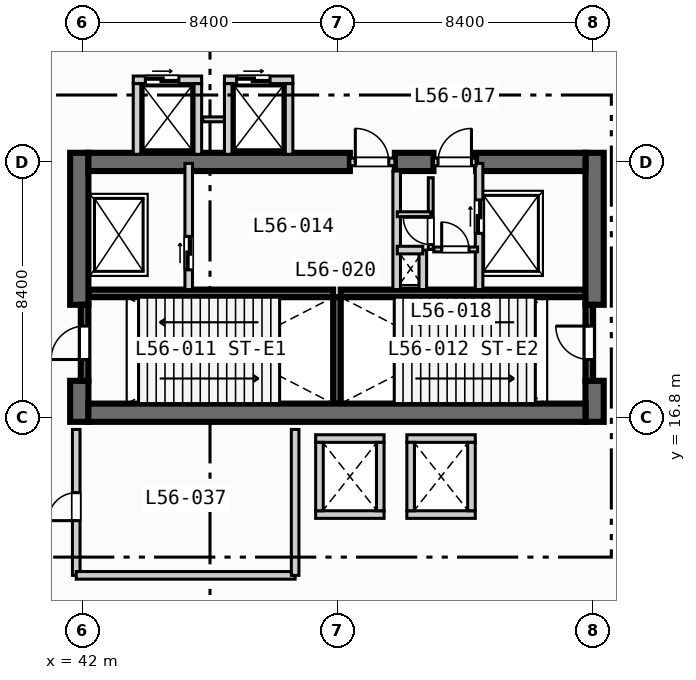
"""IFC4 building model, lengths in metres.
Left out: names, types, materials, properties, quantities, classifications, styles, units other than length and angle.
Written with IfcOpenShell. Run it as: python <this file> out.ifc"""

import sys

from ifc_helpers import new_model, si_unit, direction, frame, frame_2d, origin, place, context, subcontext, project, spatial, rectangle, extrude, element, fill, save


model = new_model("IFC4")
c1 = context("Model", 3, precision=1e-05, world=origin(), true_north=direction((0.0, 1.0)))
c2 = subcontext(c1, "Body", "Model", "MODEL_VIEW")
j1 = project(units=[si_unit("LENGTHUNIT", "METRE"), si_unit("PLANEANGLEUNIT", "RADIAN")], contexts=[c1])
p1 = place(None, origin())
s1 = spatial("IfcSite", under=j1, at=p1, CompositionType="ELEMENT")
p2 = place(p1, origin())
s2 = spatial("IfcBuilding", under=s1, at=p2, CompositionType="ELEMENT")
p3 = place(p2, frame((0.0, 0.0, 228.2)))
s3 = spatial("IfcBuildingStorey", under=s2, at=p3, CompositionType="ELEMENT", Elevation=228.2)
for number, where, z_axis, x_axis in (
    (1, (42.2, 20.875, 0.0), (0.0, 0.0, 1.0), (1.0, 0.0, 0.0)),
    (2, (50.5, 20.875, 0.0), (0.0, 0.0, 1.0), (1.0, 0.0, 0.0)),
):
    element("IfcWall", number, at=place(p3, frame(where, z_axis=z_axis, x_axis=x_axis)), inside=s3, PredefinedType="SOLIDWALL", context=c2, shape_type="SweptSolid", body=[
        extrude(rectangle(XDim=8.05, YDim=0.25, at=frame_2d((4.025, 0.0))), origin(), (0.0, 0.0, 1.0), 5.77),
    ])
p4 = place(p3, frame((50.375, 17.25, 0.0), z_axis=(0.0, 0.0, 1.0), x_axis=(0.0, 1.0, 0.0)))
e3 = element("IfcWall", 3, at=p4, inside=s3, PredefinedType="SOLIDWALL", context=c2, shape_type="SweptSolid", body=[
    extrude(rectangle(XDim=3.5, YDim=0.25, at=frame_2d((1.75, 0.0))), origin(), (0.0, 0.0, 1.0), 5.77),
])
p5 = place(p3, frame((41.9, 16.65, 0.0), z_axis=(0.0, 0.0, 1.0), x_axis=(0.0, 1.0, 0.0)))
e4 = element("IfcWall", 4, at=p5, inside=s3, PredefinedType="SHEAR", context=c2, shape_type="SweptSolid", body=[
    extrude(rectangle(XDim=1.35, YDim=0.6, at=frame_2d((0.675, 0.0))), origin(), (0.0, 0.0, 1.0), 5.77),
])
p6 = place(p3, frame((41.9, 20.5, 0.0), z_axis=(0.0, 0.0, 1.0), x_axis=(0.0, 1.0, 0.0)))
e5 = element("IfcWall", 5, at=p6, inside=s3, PredefinedType="SHEAR", context=c2, shape_type="SweptSolid", body=[
    extrude(rectangle(XDim=5.0, YDim=0.6, at=frame_2d((2.5, 0.0))), origin(), (0.0, 0.0, 1.0), 5.77),
])
p7 = place(p3, frame((58.85, 16.65, 0.0), z_axis=(0.0, 0.0, 1.0), x_axis=(0.0, 1.0, 0.0)))
e6 = element("IfcWall", 6, at=p7, inside=s3, PredefinedType="SHEAR", context=c2, shape_type="SweptSolid", body=[
    extrude(rectangle(XDim=1.35, YDim=0.6, at=frame_2d((0.675, 0.0))), origin(), (0.0, 0.0, 1.0), 5.77),
])
p8 = place(p3, frame((58.85, 20.5, 0.0), z_axis=(0.0, 0.0, 1.0), x_axis=(0.0, 1.0, 0.0)))
e7 = element("IfcWall", 7, at=p8, inside=s3, PredefinedType="SHEAR", context=c2, shape_type="SweptSolid", body=[
    extrude(rectangle(XDim=5.0, YDim=0.6, at=frame_2d((2.5, 0.0))), origin(), (0.0, 0.0, 1.0), 5.77),
])
p9 = place(p3, frame((42.2, 16.95, 0.0), z_axis=(0.0, 0.0, 1.0), x_axis=(1.0, 0.0, 0.0)))
e8 = element("IfcWall", 8, at=p9, inside=s3, PredefinedType="SHEAR", context=c2, shape_type="SweptSolid", body=[
    extrude(rectangle(XDim=16.35, YDim=0.6, at=frame_2d((8.175, 0.0))), origin(), (0.0, 0.0, 1.0), 5.77),
])
p10 = place(p3, frame((42.2, 25.2, 0.0), z_axis=(0.0, 0.0, 1.0), x_axis=(1.0, 0.0, 0.0)))
e9 = element("IfcWall", 9, at=p10, inside=s3, PredefinedType="SHEAR", context=c2, shape_type="SweptSolid", body=[
    extrude(rectangle(XDim=8.6, YDim=0.6, at=frame_2d((4.3, 0.0))), origin(), (0.0, 0.0, 1.0), 5.77),
])
p11 = place(p3, frame((52.28, 25.2, 0.0), z_axis=(0.0, 0.0, 1.0), x_axis=(1.0, 0.0, 0.0)))
e10 = element("IfcWall", 10, at=p11, inside=s3, PredefinedType="SHEAR", context=c2, shape_type="SweptSolid", body=[
    extrude(rectangle(XDim=1.27, YDim=0.6, at=frame_2d((0.635, 0.0))), origin(), (0.0, 0.0, 1.0), 5.77),
])
p12 = place(p3, frame((54.95, 25.2, 0.0), z_axis=(0.0, 0.0, 1.0), x_axis=(1.0, 0.0, 0.0)))
e11 = element("IfcWall", 11, at=p12, inside=s3, PredefinedType="SHEAR", context=c2, shape_type="SweptSolid", body=[
    extrude(rectangle(XDim=3.6, YDim=0.6, at=frame_2d((1.8, 0.0))), origin(), (0.0, 0.0, 1.0), 5.77),
])
p13 = place(p3, frame((42.075, 18.0, 0.0), z_axis=(0.0, 0.0, 1.0), x_axis=(0.0, 1.0, 0.0)))
e12 = element("IfcWall", 12, at=p13, inside=s3, PredefinedType="SOLIDWALL", context=c2, shape_type="SweptSolid", body=[
    extrude(rectangle(XDim=2.5, YDim=0.25, at=frame_2d((1.25, 0.0))), origin(), (0.0, 0.0, 1.0), 5.77),
])
p14 = place(p13, frame((0.7, 0.0, 0.0)))
e13 = element("IfcOpeningElement", 13, at=p14, cuts=e12, PredefinedType="OPENING", context=c2, shape_type="SweptSolid", body=[
    extrude(rectangle(XDim=1.1, YDim=2.15, at=frame_2d((0.55, 1.075))), frame((0.0, 0.135, 0.0), z_axis=(0.0, -1.0, 0.0), x_axis=(1.0, 0.0, 0.0)), (0.0, 0.0, 1.0), 0.27),
])
p15 = place(p3, frame((58.675, 18.0, 0.0), z_axis=(0.0, 0.0, 1.0), x_axis=(0.0, 1.0, 0.0)))
e14 = element("IfcWall", 14, at=p15, inside=s3, PredefinedType="SOLIDWALL", context=c2, shape_type="SweptSolid", body=[
    extrude(rectangle(XDim=2.5, YDim=0.25, at=frame_2d((1.25, 0.0))), origin(), (0.0, 0.0, 1.0), 5.77),
])
p16 = place(p15, frame((0.7, 0.0, 0.0)))
e15 = element("IfcOpeningElement", 15, at=p16, cuts=e14, PredefinedType="OPENING", context=c2, shape_type="SweptSolid", body=[
    extrude(rectangle(XDim=1.1, YDim=2.15, at=frame_2d((0.55, 1.075))), frame((0.0, 0.135, 0.0), z_axis=(0.0, -1.0, 0.0), x_axis=(1.0, 0.0, 0.0)), (0.0, 0.0, 1.0), 0.27),
])
p17 = place(p3, frame((45.5, 21.0, 0.0), z_axis=(0.0, 0.0, 1.0), x_axis=(0.0, 1.0, 0.0)))
e16 = element("IfcWall", 16, at=p17, inside=s3, PredefinedType="SOLIDWALL", context=c2, shape_type="SweptSolid", body=[
    extrude(rectangle(XDim=4.15, YDim=0.25, at=frame_2d((2.075, 0.0))), origin(), (0.0, 0.0, 1.0), 5.77),
])
p18 = place(p17, frame((0.65, 0.0, 0.0)))
e17 = element("IfcOpeningElement", 17, at=p18, cuts=e16, PredefinedType="OPENING", context=c2, shape_type="SweptSolid", body=[
    extrude(rectangle(XDim=1.1, YDim=2.15, at=frame_2d((0.55, 1.075))), frame((0.0, 0.135, 0.0), z_axis=(0.0, -1.0, 0.0), x_axis=(1.0, 0.0, 0.0)), (0.0, 0.0, 1.0), 0.27),
])
p19 = place(p3, frame((50.8, 25.2, 0.0), z_axis=(0.0, 0.0, 1.0), x_axis=(1.0, 0.0, 0.0)))
e18 = element("IfcWall", 18, at=p19, inside=s3, PredefinedType="SOLIDWALL", context=c2, shape_type="SweptSolid", body=[
    extrude(rectangle(XDim=1.48, YDim=0.25, at=frame_2d((0.74, 0.0))), origin(), (0.0, 0.0, 1.0), 5.77),
])
p20 = place(p19, frame((0.18, 0.0, 0.0)))
e19 = element("IfcOpeningElement", 19, at=p20, cuts=e18, PredefinedType="OPENING", context=c2, shape_type="SweptSolid", body=[
    extrude(rectangle(XDim=1.1, YDim=2.15, at=frame_2d((0.55, 1.075))), frame((0.0, 0.135, 0.0), z_axis=(0.0, -1.0, 0.0), x_axis=(1.0, 0.0, 0.0)), (0.0, 0.0, 1.0), 0.27),
])
p21 = place(p3, frame((52.34, 21.0, 0.0), z_axis=(0.0, 0.0, 1.0), x_axis=(0.0, 1.0, 0.0)))
e20 = element("IfcWall", 20, at=p21, inside=s3, PredefinedType="SOLIDWALL", context=c2, shape_type="SweptSolid", body=[
    extrude(rectangle(XDim=3.9, YDim=0.25, at=frame_2d((1.95, 0.0))), origin(), (0.0, 0.0, 1.0), 5.77),
])
p22 = place(p3, frame((55.05, 21.0, 0.0), z_axis=(0.0, 0.0, 1.0), x_axis=(0.0, 1.0, 0.0)))
e21 = element("IfcWall", 21, at=p22, inside=s3, PredefinedType="SOLIDWALL", context=c2, shape_type="SweptSolid", body=[
    extrude(rectangle(XDim=4.15, YDim=0.25, at=frame_2d((2.075, 0.0))), origin(), (0.0, 0.0, 1.0), 5.77),
])
p23 = place(p22, frame((1.85, 0.0, 0.0)))
e22 = element("IfcOpeningElement", 22, at=p23, cuts=e21, PredefinedType="OPENING", context=c2, shape_type="SweptSolid", body=[
    extrude(rectangle(XDim=1.1, YDim=2.15, at=frame_2d((0.55, 1.075))), frame((0.0, 0.135, 0.0), z_axis=(0.0, -1.0, 0.0), x_axis=(1.0, 0.0, 0.0)), (0.0, 0.0, 1.0), 0.27),
])
p24 = place(p3, frame((53.55, 25.2, 0.0), z_axis=(0.0, 0.0, 1.0), x_axis=(1.0, 0.0, 0.0)))
e23 = element("IfcWall", 23, at=p24, inside=s3, PredefinedType="SOLIDWALL", context=c2, shape_type="SweptSolid", body=[
    extrude(rectangle(XDim=1.4, YDim=0.25, at=frame_2d((0.7, 0.0))), origin(), (0.0, 0.0, 1.0), 5.77),
])
p25 = place(p24, frame((0.15, 0.0, 0.0)))
e24 = element("IfcOpeningElement", 24, at=p25, cuts=e23, PredefinedType="OPENING", context=c2, shape_type="SweptSolid", body=[
    extrude(rectangle(XDim=1.1, YDim=2.15, at=frame_2d((0.55, 1.075))), frame((0.0, 0.135, 0.0), z_axis=(0.0, -1.0, 0.0), x_axis=(1.0, 0.0, 0.0)), (0.0, 0.0, 1.0), 0.27),
])
p26 = place(p3, frame((53.2, 21.0, 0.0), z_axis=(0.0, 0.0, 1.0), x_axis=(0.0, 1.0, 0.0)))
e25 = element("IfcWall", 25, at=p26, inside=s3, PredefinedType="SOLIDWALL", context=c2, shape_type="SweptSolid", body=[
    extrude(rectangle(XDim=1.3, YDim=0.25, at=frame_2d((0.65, 0.0))), origin(), (0.0, 0.0, 1.0), 5.77),
])
p27 = place(p3, frame((52.36, 22.3, 0.0), z_axis=(0.0, 0.0, 1.0), x_axis=(1.0, 0.0, 0.0)))
e26 = element("IfcWall", 26, at=p27, inside=s3, PredefinedType="SOLIDWALL", context=c2, shape_type="SweptSolid", body=[
    extrude(rectangle(XDim=0.84, YDim=0.25, at=frame_2d((0.42, 0.0))), origin(), (0.0, 0.0, 1.0), 5.77),
])
p28 = place(p3, frame((53.56, 22.32, 0.0), z_axis=(0.0, 0.0, 1.0), x_axis=(1.0, 0.0, 0.0)))
e27 = element("IfcWall", 27, at=p28, inside=s3, PredefinedType="PARTITIONING", context=c2, shape_type="SweptSolid", body=[
    extrude(rectangle(XDim=1.44, YDim=0.16, at=frame_2d((0.72, 0.0))), origin(), (0.0, 0.0, 1.0), 5.77),
])
p29 = place(p28, frame((0.26, 0.0, 0.0)))
e28 = element("IfcOpeningElement", 28, at=p29, cuts=e27, PredefinedType="OPENING", context=c2, shape_type="SweptSolid", body=[
    extrude(rectangle(XDim=0.9, YDim=2.1, at=frame_2d((0.45, 1.05))), frame((0.0, 0.09, 0.0), z_axis=(0.0, -1.0, 0.0), x_axis=(1.0, 0.0, 0.0)), (0.0, 0.0, 1.0), 0.18),
])
p30 = place(p3, frame((53.46, 22.32, 0.0), z_axis=(0.0, 0.0, 1.0), x_axis=(0.0, 1.0, 0.0)))
e29 = element("IfcWall", 29, at=p30, inside=s3, PredefinedType="PARTITIONING", context=c2, shape_type="SweptSolid", body=[
    extrude(rectangle(XDim=2.36, YDim=0.16, at=frame_2d((1.18, 0.0))), origin(), (0.0, 0.0, 1.0), 5.77),
])
p31 = place(p30, frame((0.16, 0.0, 0.0)))
e30 = element("IfcOpeningElement", 30, at=p31, cuts=e29, PredefinedType="OPENING", context=c2, shape_type="SweptSolid", body=[
    extrude(rectangle(XDim=0.9, YDim=2.1, at=frame_2d((0.45, 1.05))), frame((0.0, 0.09, 0.0), z_axis=(0.0, -1.0, 0.0), x_axis=(1.0, 0.0, 0.0)), (0.0, 0.0, 1.0), 0.18),
])
p32 = place(p3, frame((52.36, 23.48, 0.0), z_axis=(0.0, 0.0, 1.0), x_axis=(1.0, 0.0, 0.0)))
e31 = element("IfcWall", 31, at=p32, inside=s3, PredefinedType="PARTITIONING", context=c2, shape_type="SweptSolid", body=[
    extrude(rectangle(XDim=1.1, YDim=0.16, at=frame_2d((0.55, 0.0))), origin(), (0.0, 0.0, 1.0), 5.77),
])
for number, where, z_axis, x_axis in (
    (32, (49.675, 13.6, 0.0), (0.0, 0.0, 1.0), (1.0, 0.0, 0.0)),
    (33, (49.675, 16.1, 0.0), (0.0, 0.0, 1.0), (1.0, 0.0, 0.0)),
    (34, (49.8, 13.725, 0.0), (0.0, 0.0, 1.0), (0.0, 1.0, 0.0)),
    (35, (51.8, 13.725, 0.0), (0.0, 0.0, 1.0), (0.0, 1.0, 0.0)),
    (36, (52.675, 13.6, 0.0), (0.0, 0.0, 1.0), (1.0, 0.0, 0.0)),
    (37, (52.675, 16.1, 0.0), (0.0, 0.0, 1.0), (1.0, 0.0, 0.0)),
    (38, (52.8, 13.725, 0.0), (0.0, 0.0, 1.0), (0.0, 1.0, 0.0)),
    (39, (54.8, 13.725, 0.0), (0.0, 0.0, 1.0), (0.0, 1.0, 0.0)),
):
    element("IfcWall", number, at=place(p3, frame(where, z_axis=z_axis, x_axis=x_axis)), inside=s3, PredefinedType="SOLIDWALL", context=c2, shape_type="SweptSolid", body=[
        extrude(rectangle(XDim=2.25, YDim=0.25, at=frame_2d((1.125, 0.0))), origin(), (0.0, 0.0, 1.0), 5.77),
    ])
p33 = place(p3, frame((43.675, 27.9, 0.0), z_axis=(0.0, 0.0, 1.0), x_axis=(1.0, 0.0, 0.0)))
e40 = element("IfcWall", 40, at=p33, inside=s3, PredefinedType="SOLIDWALL", context=c2, shape_type="SweptSolid", body=[
    extrude(rectangle(XDim=2.25, YDim=0.25, at=frame_2d((1.125, 0.0))), origin(), (0.0, 0.0, 1.0), 5.77),
])
p34 = place(p33, frame((0.4, 0.0, 0.0)))
e41 = element("IfcOpeningElement", 41, at=p34, cuts=e40, PredefinedType="OPENING", context=c2, shape_type="SweptSolid", body=[
    extrude(rectangle(XDim=1.1, YDim=2.15, at=frame_2d((0.55, 1.075))), frame((0.0, 0.135, 0.0), z_axis=(0.0, -1.0, 0.0), x_axis=(1.0, 0.0, 0.0)), (0.0, 0.0, 1.0), 0.27),
])
for number, where, z_axis, x_axis in (
    (42, (43.8, 25.45, 0.0), (0.0, 0.0, 1.0), (0.0, 1.0, 0.0)),
    (43, (45.8, 25.45, 0.0), (0.0, 0.0, 1.0), (0.0, 1.0, 0.0)),
):
    element("IfcWall", number, at=place(p3, frame(where, z_axis=z_axis, x_axis=x_axis)), inside=s3, PredefinedType="SOLIDWALL", context=c2, shape_type="SweptSolid", body=[
        extrude(rectangle(XDim=2.325, YDim=0.25, at=frame_2d((1.163, 0.0))), origin(), (0.0, 0.0, 1.0), 5.77),
    ])
p35 = place(p3, frame((45.96, 26.6, 0.0), z_axis=(0.0, 0.0, 1.0), x_axis=(1.0, 0.0, 0.0)))
e44 = element("IfcWall", 44, at=p35, inside=s3, PredefinedType="PARTITIONING", context=c2, shape_type="SweptSolid", body=[
    extrude(rectangle(XDim=0.88, YDim=0.16, at=frame_2d((0.44, 0.0))), origin(), (0.0, 0.0, 1.0), 5.77),
])
p36 = place(p3, frame((46.675, 27.9, 0.0), z_axis=(0.0, 0.0, 1.0), x_axis=(1.0, 0.0, 0.0)))
e45 = element("IfcWall", 45, at=p36, inside=s3, PredefinedType="SOLIDWALL", context=c2, shape_type="SweptSolid", body=[
    extrude(rectangle(XDim=2.25, YDim=0.25, at=frame_2d((1.125, 0.0))), origin(), (0.0, 0.0, 1.0), 5.77),
])
p37 = place(p36, frame((0.4, 0.0, 0.0)))
e46 = element("IfcOpeningElement", 46, at=p37, cuts=e45, PredefinedType="OPENING", context=c2, shape_type="SweptSolid", body=[
    extrude(rectangle(XDim=1.1, YDim=2.15, at=frame_2d((0.55, 1.075))), frame((0.0, 0.135, 0.0), z_axis=(0.0, -1.0, 0.0), x_axis=(1.0, 0.0, 0.0)), (0.0, 0.0, 1.0), 0.27),
])
for number, where, z_axis, x_axis in (
    (47, (46.8, 25.45, 0.0), (0.0, 0.0, 1.0), (0.0, 1.0, 0.0)),
    (48, (48.8, 25.45, 0.0), (0.0, 0.0, 1.0), (0.0, 1.0, 0.0)),
):
    element("IfcWall", number, at=place(p3, frame(where, z_axis=z_axis, x_axis=x_axis)), inside=s3, PredefinedType="SOLIDWALL", context=c2, shape_type="SweptSolid", body=[
        extrude(rectangle(XDim=2.325, YDim=0.25, at=frame_2d((1.163, 0.0))), origin(), (0.0, 0.0, 1.0), 5.77),
    ])
p38 = place(p3, frame((41.8, 11.6, 0.0), z_axis=(0.0, 0.0, 1.0), x_axis=(0.0, 1.0, 0.0)))
e49 = element("IfcWall", 49, at=p38, inside=s3, PredefinedType="SOLIDWALL", context=c2, shape_type="SweptSolid", body=[
    extrude(rectangle(XDim=4.8, YDim=0.25, at=frame_2d((2.4, 0.0))), origin(), (0.0, 0.0, 1.0), 5.407),
])
p39 = place(p38, frame((1.8, 0.0, 0.0)))
e50 = element("IfcOpeningElement", 50, at=p39, cuts=e49, PredefinedType="OPENING", context=c2, shape_type="SweptSolid", body=[
    extrude(rectangle(XDim=0.92, YDim=2.1, at=frame_2d((0.46, 1.05))), frame((0.0, 0.135, 0.0), z_axis=(0.0, -1.0, 0.0), x_axis=(1.0, 0.0, 0.0)), (0.0, 0.0, 1.0), 0.27),
])
p40 = place(p3, frame((41.8, 11.6, 0.0), z_axis=(0.0, 0.0, 1.0), x_axis=(1.0, 0.0, 0.0)))
e51 = element("IfcWall", 51, at=p40, inside=s3, PredefinedType="SOLIDWALL", context=c2, shape_type="SweptSolid", body=[
    extrude(rectangle(XDim=7.2, YDim=0.25, at=frame_2d((3.6, 0.0))), origin(), (0.0, 0.0, 1.0), 5.77),
])
p41 = place(p3, frame((49.0, 11.6, 0.0), z_axis=(0.0, 0.0, 1.0), x_axis=(0.0, 1.0, 0.0)))
e52 = element("IfcWall", 52, at=p41, inside=s3, PredefinedType="SOLIDWALL", context=c2, shape_type="SweptSolid", body=[
    extrude(rectangle(XDim=4.8, YDim=0.25, at=frame_2d((2.4, 0.0))), origin(), (0.0, 0.0, 1.0), 5.77),
])
p42 = place(p14, origin())
e53 = element("IfcDoor", 53, at=p42, inside=s3, OperationType="SINGLE_SWING_LEFT", PredefinedType="DOOR", context=c2, shape_type="SweptSolid", body=[
    extrude(rectangle(XDim=1.1, YDim=2.15, at=frame_2d((0.55, 1.075))), frame((0.0, 0.025, 0.0), z_axis=(0.0, -1.0, 0.0), x_axis=(1.0, 0.0, 0.0)), (0.0, 0.0, 1.0), 0.05),
])
fill(e13, e53)
p43 = place(p16, origin())
e54 = element("IfcDoor", 54, at=p43, inside=s3, OperationType="SINGLE_SWING_RIGHT", PredefinedType="DOOR", context=c2, shape_type="SweptSolid", body=[
    extrude(rectangle(XDim=1.1, YDim=2.15, at=frame_2d((0.55, 1.075))), frame((0.0, 0.025, 0.0), z_axis=(0.0, -1.0, 0.0), x_axis=(1.0, 0.0, 0.0)), (0.0, 0.0, 1.0), 0.05),
])
fill(e15, e54)
p44 = place(p18, origin())
e55 = element("IfcDoor", 55, at=p44, inside=s3, OperationType="SLIDING_TO_LEFT", PredefinedType="DOOR", context=c2, shape_type="SweptSolid", body=[
    extrude(rectangle(XDim=1.1, YDim=2.15, at=frame_2d((0.55, 1.075))), frame((0.0, 0.025, 0.0), z_axis=(0.0, -1.0, 0.0), x_axis=(1.0, 0.0, 0.0)), (0.0, 0.0, 1.0), 0.05),
])
fill(e17, e55)
p45 = place(p20, origin())
e56 = element("IfcDoor", 56, at=p45, inside=s3, OperationType="SINGLE_SWING_LEFT", PredefinedType="DOOR", context=c2, shape_type="SweptSolid", body=[
    extrude(rectangle(XDim=1.1, YDim=2.15, at=frame_2d((0.55, 1.075))), frame((0.0, 0.025, 0.0), z_axis=(0.0, -1.0, 0.0), x_axis=(1.0, 0.0, 0.0)), (0.0, 0.0, 1.0), 0.05),
])
fill(e19, e56)
p46 = place(p23, origin())
e57 = element("IfcDoor", 57, at=p46, inside=s3, OperationType="SLIDING_TO_LEFT", PredefinedType="DOOR", context=c2, shape_type="SweptSolid", body=[
    extrude(rectangle(XDim=1.1, YDim=2.15, at=frame_2d((0.55, 1.075))), frame((0.0, 0.025, 0.0), z_axis=(0.0, -1.0, 0.0), x_axis=(1.0, 0.0, 0.0)), (0.0, 0.0, 1.0), 0.05),
])
fill(e22, e57)
p47 = place(p25, origin())
e58 = element("IfcDoor", 58, at=p47, inside=s3, OperationType="SINGLE_SWING_RIGHT", PredefinedType="DOOR", context=c2, shape_type="SweptSolid", body=[
    extrude(rectangle(XDim=1.1, YDim=2.15, at=frame_2d((0.55, 1.075))), frame((0.0, 0.025, 0.0), z_axis=(0.0, -1.0, 0.0), x_axis=(1.0, 0.0, 0.0)), (0.0, 0.0, 1.0), 0.05),
])
fill(e24, e58)
p48 = place(p29, origin())
e59 = element("IfcDoor", 59, at=p48, inside=s3, OperationType="SINGLE_SWING_LEFT", PredefinedType="DOOR", context=c2, shape_type="SweptSolid", body=[
    extrude(rectangle(XDim=0.9, YDim=2.1, at=frame_2d((0.45, 1.05))), frame((0.0, 0.025, 0.0), z_axis=(0.0, -1.0, 0.0), x_axis=(1.0, 0.0, 0.0)), (0.0, 0.0, 1.0), 0.05),
])
fill(e28, e59)
p49 = place(p31, origin())
e60 = element("IfcDoor", 60, at=p49, inside=s3, OperationType="SINGLE_SWING_RIGHT", PredefinedType="DOOR", context=c2, shape_type="SweptSolid", body=[
    extrude(rectangle(XDim=0.9, YDim=2.1, at=frame_2d((0.45, 1.05))), frame((0.0, 0.025, 0.0), z_axis=(0.0, -1.0, 0.0), x_axis=(1.0, 0.0, 0.0)), (0.0, 0.0, 1.0), 0.05),
])
fill(e30, e60)
p50 = place(p34, origin())
e61 = element("IfcDoor", 61, at=p50, inside=s3, OperationType="SLIDING_TO_LEFT", PredefinedType="DOOR", context=c2, shape_type="SweptSolid", body=[
    extrude(rectangle(XDim=1.1, YDim=2.15, at=frame_2d((0.55, 1.075))), frame((0.0, 0.025, 0.0), z_axis=(0.0, -1.0, 0.0), x_axis=(1.0, 0.0, 0.0)), (0.0, 0.0, 1.0), 0.05),
])
fill(e41, e61)
p51 = place(p37, origin())
e62 = element("IfcDoor", 62, at=p51, inside=s3, OperationType="SLIDING_TO_LEFT", PredefinedType="DOOR", context=c2, shape_type="SweptSolid", body=[
    extrude(rectangle(XDim=1.1, YDim=2.15, at=frame_2d((0.55, 1.075))), frame((0.0, 0.025, 0.0), z_axis=(0.0, -1.0, 0.0), x_axis=(1.0, 0.0, 0.0)), (0.0, 0.0, 1.0), 0.05),
])
fill(e46, e62)
p52 = place(p39, origin())
e63 = element("IfcDoor", 63, at=p52, inside=s3, OperationType="SINGLE_SWING_LEFT", PredefinedType="DOOR", context=c2, shape_type="SweptSolid", body=[
    extrude(rectangle(XDim=0.92, YDim=2.1, at=frame_2d((0.46, 1.05))), frame((0.0, 0.025, 0.0), z_axis=(0.0, -1.0, 0.0), x_axis=(1.0, 0.0, 0.0)), (0.0, 0.0, 1.0), 0.05),
])
fill(e50, e63)
save(model, sys.argv[1])
